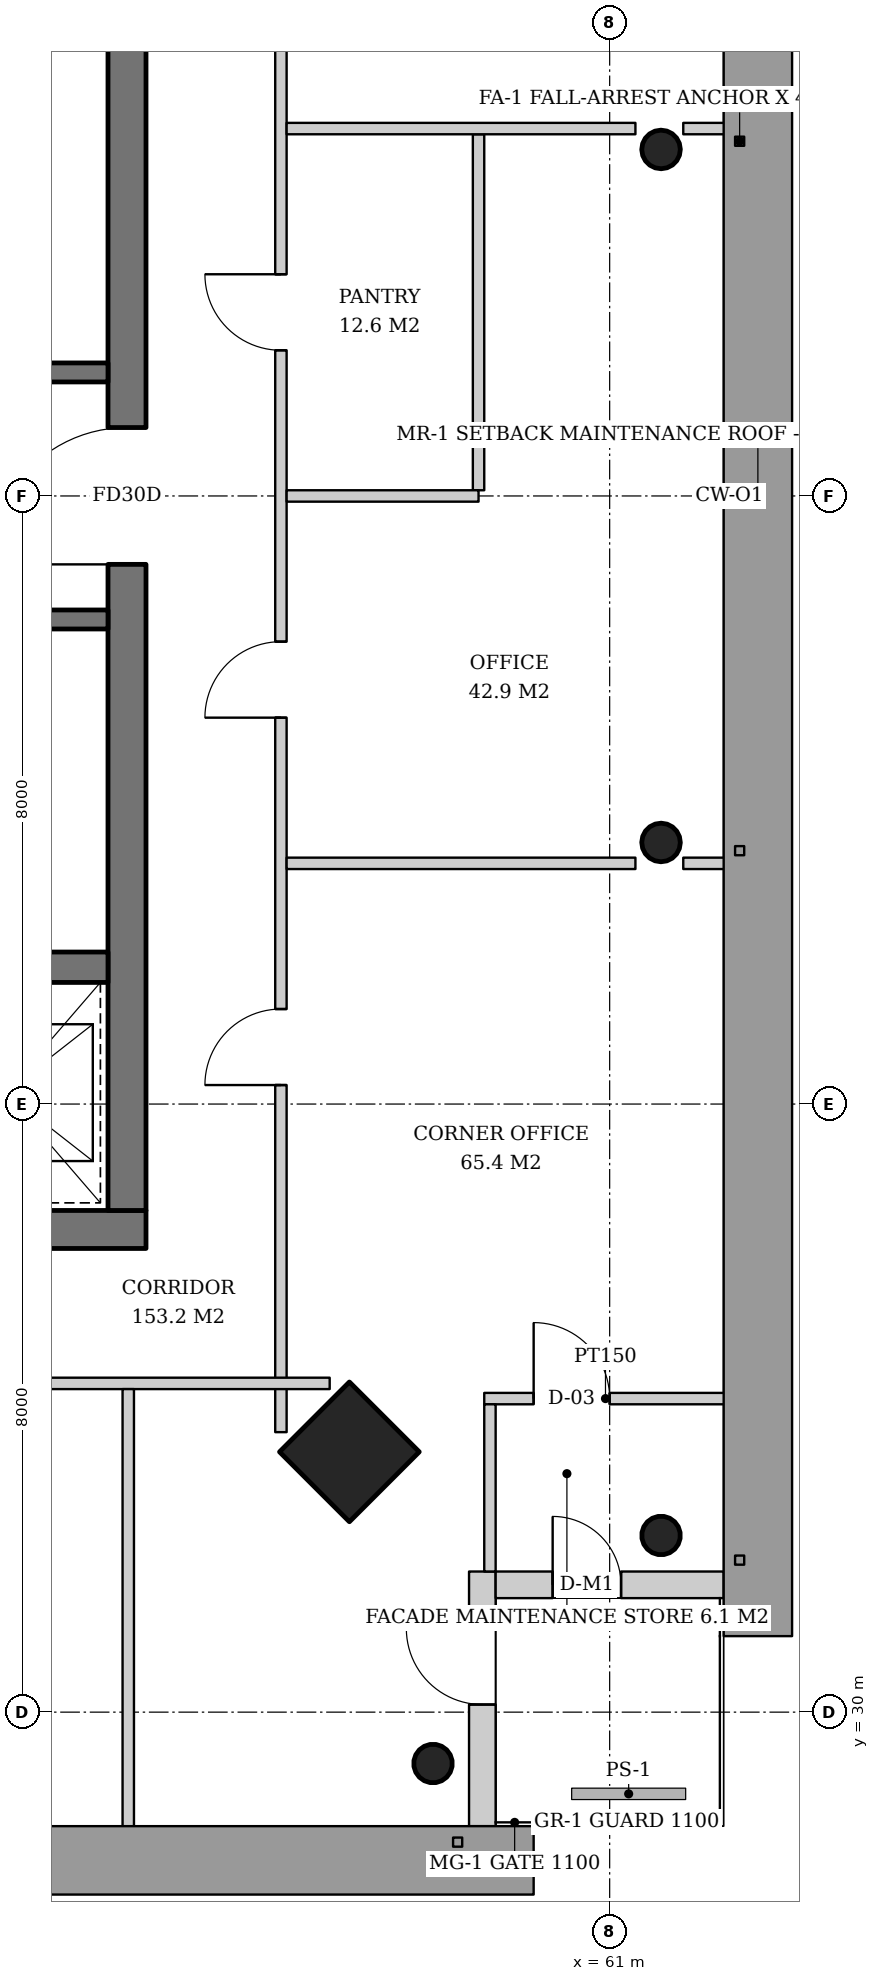
"""IFC4 building model, lengths in metres.
Left out: names, types, materials, properties, quantities, classifications, styles, units other than length and angle.
Written with IfcOpenShell. Run it as: python <this file> out.ifc"""

import sys

from ifc_helpers import new_model, si_unit, direction, frame, frame_2d, origin, origin_2d, place, context, subcontext, project, spatial, rectangle, hollow_circle, extrude, element, fill, save


model = new_model("IFC4")
c1 = context("Model", 3, precision=1e-05, world=origin(), true_north=direction((0.0, 1.0)))
c2 = subcontext(c1, "Body", "Model", "MODEL_VIEW")
j1 = project(units=[si_unit("LENGTHUNIT", "METRE"), si_unit("PLANEANGLEUNIT", "RADIAN")], contexts=[c1])
p1 = place(None, origin())
s1 = spatial("IfcSite", under=j1, at=p1, CompositionType="ELEMENT")
p2 = place(p1, origin())
s2 = spatial("IfcBuilding", under=s1, at=p2, CompositionType="ELEMENT")
p3 = place(p2, frame((0.0, 0.0, 249.0)))
s3 = spatial("IfcBuildingStorey", under=s2, at=p3, CompositionType="ELEMENT", Elevation=249.0)
p4 = place(p3, frame((61.714, 32.286, 0.0), z_axis=(-0.031962158256, 0.031962158256, 0.998977898093), x_axis=(-0.707106781187, -0.707106781187, 0.0)))
e1 = element("IfcColumn", 1, at=p4, inside=s3, PredefinedType="COLUMN", context=c2, shape_type="SweptSolid", body=[
    extrude(hollow_circle(Radius=0.254, WallThickness=0.02, at=origin_2d()), origin(), (0.0, 0.0, 1.0), 3.804),
])
for number, where, z_axis, x_axis in (
    (2, (61.714, 41.428, 0.0), (-0.032, 0.011, 0.999), (-0.316, -0.949, 0.0)),
    (3, (61.714, 50.572, 0.0), (-0.032, -0.011, 0.999), (0.316, -0.949, 0.0)),
):
    element("IfcColumn", number, at=place(p3, frame(where, z_axis=z_axis, x_axis=x_axis)), inside=s3, PredefinedType="COLUMN", context=c2, shape_type="SweptSolid", body=[
        extrude(hollow_circle(Radius=0.254, WallThickness=0.02, at=origin_2d()), origin(), (0.0, 0.0, 1.0), 3.802),
    ])
p5 = place(p3, frame((57.614, 33.386, 0.0), z_axis=(-0.031898107953, 0.031898107953, 0.998981992539), x_axis=(-0.707106781187, -0.707106781187, 0.0)))
e4 = element("IfcColumn", 4, at=p5, inside=s3, PredefinedType="COLUMN", context=c2, shape_type="SweptSolid", body=[
    extrude(rectangle(XDim=1.3, YDim=1.3, at=origin_2d()), origin(), (0.0, 0.0, 1.0), 3.804),
])
p6 = place(p3, frame((58.714, 29.286, 0.0), z_axis=(-0.031962158256, 0.031962158256, 0.998977898093), x_axis=(-0.707106781187, -0.707106781187, 0.0)))
e5 = element("IfcColumn", 5, at=p6, inside=s3, PredefinedType="COLUMN", context=c2, shape_type="SweptSolid", body=[
    extrude(hollow_circle(Radius=0.254, WallThickness=0.02, at=origin_2d()), origin(), (0.0, 0.0, 1.0), 3.804),
])
p7 = place(p3, frame((35.1, 36.35, 0.0), z_axis=(0.0, 0.0, 1.0), x_axis=(1.0, 0.0, 0.0)))
e6 = element("IfcWall", 6, at=p7, inside=s3, PredefinedType="SHEAR", context=c2, shape_type="SweptSolid", body=[
    extrude(rectangle(XDim=19.8, YDim=0.5, at=frame_2d((9.9, 0.0))), origin(), (0.0, 0.0, 1.0), 3.8),
])
p8 = place(p7, frame((3.9, 0.0, 0.0)))
e7 = element("IfcOpeningElement", 7, at=p8, cuts=e6, PredefinedType="OPENING", context=c2, shape_type="SweptSolid", body=[
    extrude(rectangle(XDim=1.0, YDim=2.1, at=frame_2d((0.5, 1.05))), frame((0.0, 0.26, 0.0), z_axis=(0.0, -1.0, 0.0), x_axis=(1.0, 0.0, 0.0)), (0.0, 0.0, 1.0), 0.52),
])
p9 = place(p7, frame((15.35, 0.0, 0.0)))
e8 = element("IfcOpeningElement", 8, at=p9, cuts=e6, PredefinedType="OPENING", context=c2, shape_type="SweptSolid", body=[
    extrude(rectangle(XDim=1.0, YDim=2.1, at=frame_2d((0.5, 1.05))), frame((0.0, 0.26, 0.0), z_axis=(0.0, -1.0, 0.0), x_axis=(1.0, 0.0, 0.0)), (0.0, 0.0, 1.0), 0.52),
])
p10 = place(p3, frame((54.65, 36.6, 0.0), z_axis=(0.0, 0.0, 1.0), x_axis=(0.0, 1.0, 0.0)))
e9 = element("IfcWall", 9, at=p10, inside=s3, PredefinedType="SHEAR", context=c2, shape_type="SweptSolid", body=[
    extrude(rectangle(XDim=18.8, YDim=0.5, at=frame_2d((9.4, 0.0))), origin(), (0.0, 0.0, 1.0), 3.8),
])
p11 = place(p10, frame((8.5, 0.0, 0.0)))
e10 = element("IfcOpeningElement", 10, at=p11, cuts=e9, PredefinedType="OPENING", context=c2, shape_type="SweptSolid", body=[
    extrude(rectangle(XDim=1.8, YDim=2.4, at=frame_2d((0.9, 1.2))), frame((0.0, 0.26, 0.0), z_axis=(0.0, -1.0, 0.0), x_axis=(1.0, 0.0, 0.0)), (0.0, 0.0, 1.0), 0.52),
])
p12 = place(p3, frame((35.6, 39.8, 0.0), z_axis=(0.0, 0.0, 1.0), x_axis=(1.0, 0.0, 0.0)))
e11 = element("IfcWall", 11, at=p12, inside=s3, PredefinedType="SHEAR", context=c2, shape_type="SweptSolid", body=[
    extrude(rectangle(XDim=18.8, YDim=0.4, at=frame_2d((9.4, 0.0))), origin(), (0.0, 0.0, 1.0), 3.8),
])
p13 = place(p3, frame((59.325, 28.5, 0.0), z_axis=(0.0, 0.0, 1.0), x_axis=(0.0, 1.0, 0.0)))
e12 = element("IfcWall", 12, at=p13, inside=s3, PredefinedType="SOLIDWALL", context=c2, shape_type="SweptSolid", body=[
    extrude(rectangle(XDim=3.35, YDim=0.35, at=frame_2d((1.675, 0.0))), origin(), (0.0, 0.0, 1.0), 3.62),
])
p14 = place(p13, frame((1.6, 0.0, 0.0)))
e13 = element("IfcOpeningElement", 13, at=p14, cuts=e12, PredefinedType="OPENING", context=c2, shape_type="SweptSolid", body=[
    extrude(rectangle(XDim=1.0, YDim=2.4, at=frame_2d((0.5, 1.2))), frame((0.0, 0.185, 0.0), z_axis=(0.0, -1.0, 0.0), x_axis=(1.0, 0.0, 0.0)), (0.0, 0.0, 1.0), 0.37),
])
p15 = place(p3, frame((59.5, 31.675, 0.0), z_axis=(0.0, 0.0, 1.0), x_axis=(1.0, 0.0, 0.0)))
e14 = element("IfcWall", 14, at=p15, inside=s3, PredefinedType="SOLIDWALL", context=c2, shape_type="SweptSolid", body=[
    extrude(rectangle(XDim=3.0, YDim=0.35, at=frame_2d((1.5, 0.0))), origin(), (0.0, 0.0, 1.0), 3.62),
])
p16 = place(p15, frame((0.75, 0.0, 0.0)))
e15 = element("IfcOpeningElement", 15, at=p16, cuts=e14, PredefinedType="OPENING", context=c2, shape_type="SweptSolid", body=[
    extrude(rectangle(XDim=0.9, YDim=2.1, at=frame_2d((0.45, 1.05))), frame((0.0, 0.185, 0.0), z_axis=(0.0, -1.0, 0.0), x_axis=(1.0, 0.0, 0.0)), (0.0, 0.0, 1.0), 0.37),
])
p17 = place(p3, frame((48.93, 47.625, 0.0), z_axis=(0.0, 0.0, 1.0), x_axis=(1.0, 0.0, 0.0)))
e16 = element("IfcWall", 16, at=p17, inside=s3, PredefinedType="SHEAR", context=c2, shape_type="SweptSolid", body=[
    extrude(rectangle(XDim=5.47, YDim=0.25, at=frame_2d((2.735, 0.0))), origin(), (0.0, 0.0, 1.0), 3.8),
])
p18 = place(p17, frame((0.78, 0.0, 0.0)))
e17 = element("IfcOpeningElement", 17, at=p18, cuts=e16, PredefinedType="OPENING", context=c2, shape_type="SweptSolid", body=[
    extrude(rectangle(XDim=1.0, YDim=2.1, at=frame_2d((0.5, 1.05))), frame((0.0, 0.135, 0.0), z_axis=(0.0, -1.0, 0.0), x_axis=(1.0, 0.0, 0.0)), (0.0, 0.0, 1.0), 0.27),
])
p19 = place(p17, frame((3.64, 0.0, 0.0)))
e18 = element("IfcOpeningElement", 18, at=p19, cuts=e16, PredefinedType="OPENING", context=c2, shape_type="SweptSolid", body=[
    extrude(rectangle(XDim=1.0, YDim=2.1, at=frame_2d((0.5, 1.05))), frame((0.0, 0.135, 0.0), z_axis=(0.0, -1.0, 0.0), x_axis=(1.0, 0.0, 0.0)), (0.0, 0.0, 1.0), 0.27),
])
p20 = place(p3, frame((48.93, 44.375, 0.0), z_axis=(0.0, 0.0, 1.0), x_axis=(1.0, 0.0, 0.0)))
e19 = element("IfcWall", 19, at=p20, inside=s3, PredefinedType="SHEAR", context=c2, shape_type="SweptSolid", body=[
    extrude(rectangle(XDim=5.47, YDim=0.25, at=frame_2d((2.735, 0.0))), origin(), (0.0, 0.0, 1.0), 3.8),
])
p21 = place(p20, frame((0.78, 0.0, 0.0)))
e20 = element("IfcOpeningElement", 20, at=p21, cuts=e19, PredefinedType="OPENING", context=c2, shape_type="SweptSolid", body=[
    extrude(rectangle(XDim=1.0, YDim=2.1, at=frame_2d((0.5, 1.05))), frame((0.0, 0.135, 0.0), z_axis=(0.0, -1.0, 0.0), x_axis=(1.0, 0.0, 0.0)), (0.0, 0.0, 1.0), 0.27),
])
p22 = place(p20, frame((3.64, 0.0, 0.0)))
e21 = element("IfcOpeningElement", 21, at=p22, cuts=e19, PredefinedType="OPENING", context=c2, shape_type="SweptSolid", body=[
    extrude(rectangle(XDim=1.0, YDim=2.1, at=frame_2d((0.5, 1.05))), frame((0.0, 0.135, 0.0), z_axis=(0.0, -1.0, 0.0), x_axis=(1.0, 0.0, 0.0)), (0.0, 0.0, 1.0), 0.27),
])
p23 = place(p3, frame((59.275, 46.075, 0.0), z_axis=(0.0, 0.0, 1.0), x_axis=(0.0, 1.0, 0.0)))
e22 = element("IfcWall", 22, at=p23, inside=s3, PredefinedType="PARTITIONING", context=c2, shape_type="SweptSolid", body=[
    extrude(rectangle(XDim=4.683, YDim=0.15, at=frame_2d((2.342, 0.0))), origin(), (0.0, 0.0, 1.0), 3.12),
])
p24 = place(p3, frame((56.675, 33.684, 0.0), z_axis=(0.0, 0.0, 1.0), x_axis=(0.0, 1.0, 0.0)))
e23 = element("IfcWall", 23, at=p24, inside=s3, PredefinedType="PARTITIONING", context=c2, shape_type="SweptSolid", body=[
    extrude(rectangle(XDim=24.633, YDim=0.15, at=frame_2d((12.316, 0.0))), origin(), (0.0, 0.0, 1.0), 3.02),
])
p25 = place(p24, frame((4.566, 0.0, 0.0)))
e24 = element("IfcOpeningElement", 24, at=p25, cuts=e23, PredefinedType="OPENING", context=c2, shape_type="SweptSolid", body=[
    extrude(rectangle(XDim=1.0, YDim=2.1, at=frame_2d((0.5, 1.05))), frame((0.0, 0.085, 0.0), z_axis=(0.0, -1.0, 0.0), x_axis=(1.0, 0.0, 0.0)), (0.0, 0.0, 1.0), 0.17),
])
p26 = place(p24, frame((9.4, 0.0, 0.0)))
e25 = element("IfcOpeningElement", 25, at=p26, cuts=e23, PredefinedType="OPENING", context=c2, shape_type="SweptSolid", body=[
    extrude(rectangle(XDim=1.0, YDim=2.1, at=frame_2d((0.5, 1.05))), frame((0.0, 0.085, 0.0), z_axis=(0.0, -1.0, 0.0), x_axis=(1.0, 0.0, 0.0)), (0.0, 0.0, 1.0), 0.17),
])
p27 = place(p24, frame((14.233, 0.0, 0.0)))
e26 = element("IfcOpeningElement", 26, at=p27, cuts=e23, PredefinedType="OPENING", context=c2, shape_type="SweptSolid", body=[
    extrude(rectangle(XDim=1.0, YDim=2.1, at=frame_2d((0.5, 1.05))), frame((0.0, 0.085, 0.0), z_axis=(0.0, -1.0, 0.0), x_axis=(1.0, 0.0, 0.0)), (0.0, 0.0, 1.0), 0.17),
])
p28 = place(p24, frame((19.066, 0.0, 0.0)))
e27 = element("IfcOpeningElement", 27, at=p28, cuts=e23, PredefinedType="OPENING", context=c2, shape_type="SweptSolid", body=[
    extrude(rectangle(XDim=1.0, YDim=2.1, at=frame_2d((0.5, 1.05))), frame((0.0, 0.085, 0.0), z_axis=(0.0, -1.0, 0.0), x_axis=(1.0, 0.0, 0.0)), (0.0, 0.0, 1.0), 0.17),
])
p29 = place(p3, frame((56.75, 41.167, 0.0), z_axis=(0.0, 0.0, 1.0), x_axis=(1.0, 0.0, 0.0)))
e28 = element("IfcWall", 28, at=p29, inside=s3, PredefinedType="PARTITIONING", context=c2, shape_type="SweptSolid", body=[
    extrude(rectangle(XDim=4.589, YDim=0.15, at=frame_2d((2.294, 0.0))), origin(), (0.0, 0.0, 1.0), 3.62),
])
p30 = place(p3, frame((61.968, 41.167, 0.0), z_axis=(0.0, 0.0, 1.0), x_axis=(1.0, 0.0, 0.0)))
e29 = element("IfcWall", 29, at=p30, inside=s3, PredefinedType="PARTITIONING", context=c2, shape_type="SweptSolid", body=[
    extrude(rectangle(XDim=0.572, YDim=0.15, at=frame_2d((0.286, 0.0))), origin(), (0.0, 0.0, 1.0), 3.62),
])
p31 = place(p3, frame((56.75, 46.0, 0.0), z_axis=(0.0, 0.0, 1.0), x_axis=(1.0, 0.0, 0.0)))
e30 = element("IfcWall", 30, at=p31, inside=s3, PredefinedType="PARTITIONING", context=c2, shape_type="SweptSolid", body=[
    extrude(rectangle(XDim=2.525, YDim=0.15, at=frame_2d((1.262, 0.0))), origin(), (0.0, 0.0, 1.0), 3.62),
])
p32 = place(p3, frame((56.75, 50.833, 0.0), z_axis=(0.0, 0.0, 1.0), x_axis=(1.0, 0.0, 0.0)))
e31 = element("IfcWall", 31, at=p32, inside=s3, PredefinedType="PARTITIONING", context=c2, shape_type="SweptSolid", body=[
    extrude(rectangle(XDim=4.589, YDim=0.15, at=frame_2d((2.294, 0.0))), origin(), (0.0, 0.0, 1.0), 3.62),
])
p33 = place(p3, frame((61.968, 50.833, 0.0), z_axis=(0.0, 0.0, 1.0), x_axis=(1.0, 0.0, 0.0)))
e32 = element("IfcWall", 32, at=p33, inside=s3, PredefinedType="PARTITIONING", context=c2, shape_type="SweptSolid", body=[
    extrude(rectangle(XDim=0.572, YDim=0.15, at=frame_2d((0.286, 0.0))), origin(), (0.0, 0.0, 1.0), 3.62),
])
p34 = place(p3, frame((32.684, 34.325, 0.0), z_axis=(0.0, 0.0, 1.0), x_axis=(1.0, 0.0, 0.0)))
e33 = element("IfcWall", 33, at=p34, inside=s3, PredefinedType="PARTITIONING", context=c2, shape_type="SweptSolid", body=[
    extrude(rectangle(XDim=24.633, YDim=0.15, at=frame_2d((12.316, 0.0))), origin(), (0.0, 0.0, 1.0), 3.02),
])
p35 = place(p34, frame((4.566, 0.0, 0.0)))
e34 = element("IfcOpeningElement", 34, at=p35, cuts=e33, PredefinedType="OPENING", context=c2, shape_type="SweptSolid", body=[
    extrude(rectangle(XDim=1.0, YDim=2.1, at=frame_2d((0.5, 1.05))), frame((0.0, 0.085, 0.0), z_axis=(0.0, -1.0, 0.0), x_axis=(1.0, 0.0, 0.0)), (0.0, 0.0, 1.0), 0.17),
])
p36 = place(p34, frame((9.4, 0.0, 0.0)))
e35 = element("IfcOpeningElement", 35, at=p36, cuts=e33, PredefinedType="OPENING", context=c2, shape_type="SweptSolid", body=[
    extrude(rectangle(XDim=1.0, YDim=2.1, at=frame_2d((0.5, 1.05))), frame((0.0, 0.085, 0.0), z_axis=(0.0, -1.0, 0.0), x_axis=(1.0, 0.0, 0.0)), (0.0, 0.0, 1.0), 0.17),
])
p37 = place(p34, frame((14.233, 0.0, 0.0)))
e36 = element("IfcOpeningElement", 36, at=p37, cuts=e33, PredefinedType="OPENING", context=c2, shape_type="SweptSolid", body=[
    extrude(rectangle(XDim=1.0, YDim=2.1, at=frame_2d((0.5, 1.05))), frame((0.0, 0.085, 0.0), z_axis=(0.0, -1.0, 0.0), x_axis=(1.0, 0.0, 0.0)), (0.0, 0.0, 1.0), 0.17),
])
p38 = place(p3, frame((54.667, 34.25, 0.0), z_axis=(0.0, 0.0, 1.0), x_axis=(0.0, -1.0, 0.0)))
e37 = element("IfcWall", 37, at=p38, inside=s3, PredefinedType="PARTITIONING", context=c2, shape_type="SweptSolid", body=[
    extrude(rectangle(XDim=5.79, YDim=0.15, at=frame_2d((2.895, 0.0))), origin(), (0.0, 0.0, 1.0), 3.12),
])
p39 = place(p3, frame((59.35, 34.125, 0.0), z_axis=(0.0, 0.0, 1.0), x_axis=(1.0, 0.0, 0.0)))
e38 = element("IfcWall", 38, at=p39, inside=s3, PredefinedType="PARTITIONING", context=c2, shape_type="SweptSolid", body=[
    extrude(rectangle(XDim=3.19, YDim=0.15, at=frame_2d((1.595, 0.0))), origin(), (0.0, 0.0, 1.0), 3.12),
])
p40 = place(p39, frame((0.65, 0.0, 0.0)))
e39 = element("IfcOpeningElement", 39, at=p40, cuts=e38, PredefinedType="OPENING", context=c2, shape_type="SweptSolid", body=[
    extrude(rectangle(XDim=1.0, YDim=2.1, at=frame_2d((0.5, 1.05))), frame((0.0, 0.085, 0.0), z_axis=(0.0, -1.0, 0.0), x_axis=(1.0, 0.0, 0.0)), (0.0, 0.0, 1.0), 0.17),
])
p41 = place(p3, frame((59.425, 34.05, 0.0), z_axis=(0.0, 0.0, 1.0), x_axis=(0.0, -1.0, 0.0)))
e40 = element("IfcWall", 40, at=p41, inside=s3, PredefinedType="PARTITIONING", context=c2, shape_type="SweptSolid", body=[
    extrude(rectangle(XDim=2.2, YDim=0.15, at=frame_2d((1.1, 0.0))), origin(), (0.0, 0.0, 1.0), 3.02),
])
p42 = place(p16, origin())
e41 = element("IfcDoor", 41, at=p42, inside=s3, OperationType="SINGLE_SWING_LEFT", PredefinedType="DOOR", context=c2, shape_type="SweptSolid", body=[
    extrude(rectangle(XDim=0.9, YDim=2.1, at=frame_2d((0.45, 1.05))), frame((0.0, 0.025, 0.0), z_axis=(0.0, -1.0, 0.0), x_axis=(1.0, 0.0, 0.0)), (0.0, 0.0, 1.0), 0.05),
])
fill(e15, e41)
p43 = place(p14, origin())
e42 = element("IfcDoor", 42, at=p43, inside=s3, OperationType="SINGLE_SWING_RIGHT", PredefinedType="DOOR", context=c2, shape_type="SweptSolid", body=[
    extrude(rectangle(XDim=1.0, YDim=2.4, at=frame_2d((0.5, 1.2))), frame((0.0, 0.025, 0.0), z_axis=(0.0, -1.0, 0.0), x_axis=(1.0, 0.0, 0.0)), (0.0, 0.0, 1.0), 0.05),
])
fill(e13, e42)
p44 = place(p11, origin())
e43 = element("IfcDoor", 43, at=p44, inside=s3, OperationType="DOUBLE_DOOR_SINGLE_SWING", PredefinedType="DOOR", context=c2, shape_type="SweptSolid", body=[
    extrude(rectangle(XDim=1.8, YDim=2.4, at=frame_2d((0.9, 1.2))), frame((0.0, 0.025, 0.0), z_axis=(0.0, -1.0, 0.0), x_axis=(1.0, 0.0, 0.0)), (0.0, 0.0, 1.0), 0.05),
])
fill(e10, e43)
p45 = place(p25, origin())
e44 = element("IfcDoor", 44, at=p45, inside=s3, OperationType="SINGLE_SWING_LEFT", PredefinedType="DOOR", context=c2, shape_type="SweptSolid", body=[
    extrude(rectangle(XDim=1.0, YDim=2.1, at=frame_2d((0.5, 1.05))), frame((0.0, 0.025, 0.0), z_axis=(0.0, -1.0, 0.0), x_axis=(1.0, 0.0, 0.0)), (0.0, 0.0, 1.0), 0.05),
])
fill(e24, e44)
p46 = place(p26, origin())
e45 = element("IfcDoor", 45, at=p46, inside=s3, OperationType="SINGLE_SWING_LEFT", PredefinedType="DOOR", context=c2, shape_type="SweptSolid", body=[
    extrude(rectangle(XDim=1.0, YDim=2.1, at=frame_2d((0.5, 1.05))), frame((0.0, 0.025, 0.0), z_axis=(0.0, -1.0, 0.0), x_axis=(1.0, 0.0, 0.0)), (0.0, 0.0, 1.0), 0.05),
])
fill(e25, e45)
p47 = place(p27, origin())
e46 = element("IfcDoor", 46, at=p47, inside=s3, OperationType="SINGLE_SWING_RIGHT", PredefinedType="DOOR", context=c2, shape_type="SweptSolid", body=[
    extrude(rectangle(XDim=1.0, YDim=2.1, at=frame_2d((0.5, 1.05))), frame((0.0, 0.025, 0.0), z_axis=(0.0, -1.0, 0.0), x_axis=(1.0, 0.0, 0.0)), (0.0, 0.0, 1.0), 0.05),
])
fill(e26, e46)
p48 = place(p40, origin())
e47 = element("IfcDoor", 47, at=p48, inside=s3, OperationType="SINGLE_SWING_LEFT", PredefinedType="DOOR", context=c2, shape_type="SweptSolid", body=[
    extrude(rectangle(XDim=1.0, YDim=2.1, at=frame_2d((0.5, 1.05))), frame((0.0, 0.025, 0.0), z_axis=(0.0, -1.0, 0.0), x_axis=(1.0, 0.0, 0.0)), (0.0, 0.0, 1.0), 0.05),
])
fill(e39, e47)
save(model, sys.argv[1])
